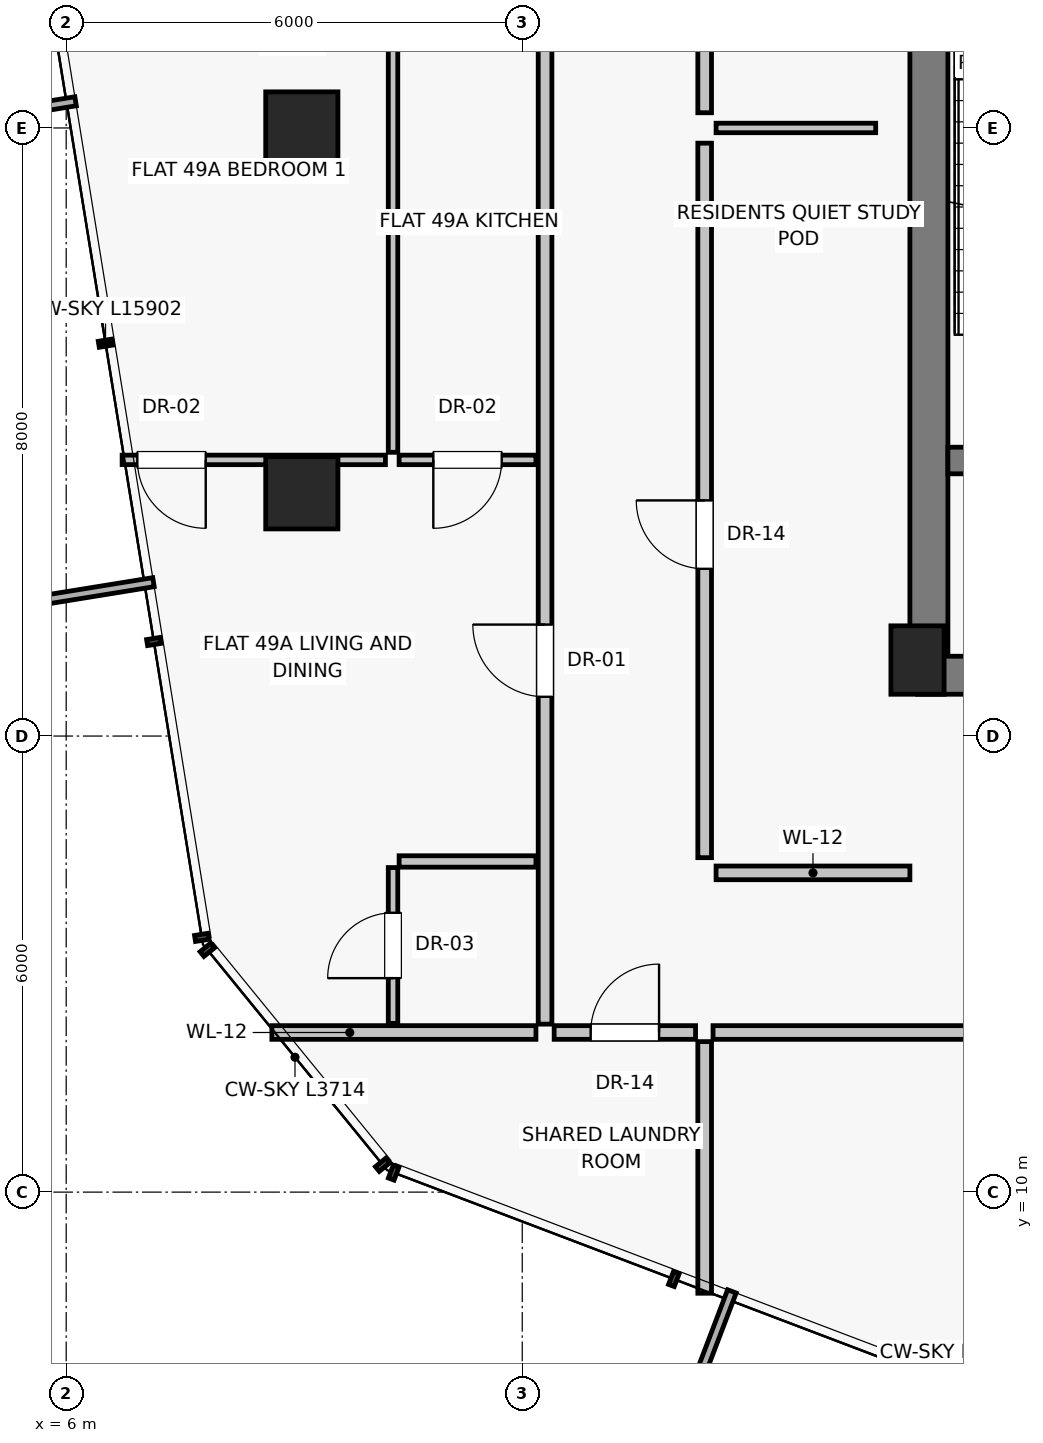
"""IFC4 building model, lengths in metres.
Left out: names, types, materials, properties, quantities, classifications, styles, units other than length and angle.
Written with IfcOpenShell. Run it as: python <this file> out.ifc"""

import sys

from ifc_helpers import new_model, si_unit, direction, frame, frame_2d, origin, origin_2d, place, context, subcontext, project, spatial, rectangle, extrude, source, transform, mapped, element, fill, save


model = new_model("IFC4")
c1 = context("Model", 3, precision=1e-05, world=origin(), true_north=direction((0.0, 1.0)))
c2 = subcontext(c1, "Body", "Model", "MODEL_VIEW")
j1 = project(units=[si_unit("LENGTHUNIT", "METRE"), si_unit("PLANEANGLEUNIT", "RADIAN")], contexts=[c1])
p1 = place(None, origin())
s1 = spatial("IfcSite", under=j1, at=p1, CompositionType="ELEMENT")
p2 = place(p1, origin())
s2 = spatial("IfcBuilding", under=s1, at=p2, CompositionType="ELEMENT")
p3 = place(p2, frame((0.0, 0.0, 174.35)))
s3 = spatial("IfcBuildingStorey", under=s2, at=p3, CompositionType="ELEMENT", Elevation=174.35)
p4 = place(p3, frame((17.2, 17.0, 0.0), z_axis=(0.0, 0.0, 1.0), x_axis=(1.0, 0.0, 0.0)))
e1 = element("IfcColumn", 1, at=p4, inside=s3, PredefinedType="PILASTER", context=c2, shape_type="SweptSolid", body=[
    extrude(rectangle(XDim=0.7, YDim=0.9, at=origin_2d()), origin(), (0.0, 0.0, 1.0), 4.5),
])
for number, where, z_axis, x_axis in (
    (2, (9.1, 24.0, -0.32), (0.0, 0.0, 1.0), (1.0, 0.0, 0.0)),
    (3, (9.1, 19.2, -0.32), (0.0, 0.0, 1.0), (1.0, 0.0, 0.0)),
):
    element("IfcColumn", number, at=place(p3, frame(where, z_axis=z_axis, x_axis=x_axis)), inside=s3, PredefinedType="COLUMN", context=c2, shape_type="SweptSolid", body=[
        extrude(rectangle(XDim=0.95, YDim=0.95, at=origin_2d()), origin(), (0.0, 0.0, 1.0), 4.82),
    ])
p5 = place(p3, frame((17.35, 16.8, 0.0), z_axis=(0.0, 0.0, 1.0), x_axis=(0.0, 1.0, 0.0)))
e4 = element("IfcWall", 4, at=p5, inside=s3, PredefinedType="SHEAR", context=c2, shape_type="SweptSolid", body=[
    extrude(rectangle(XDim=14.2, YDim=0.5, at=frame_2d((7.1, 0.0))), origin(), (0.0, 0.0, 1.0), 4.265),
])
p6 = place(p3, frame((17.2, 16.8, 0.0), z_axis=(0.0, 0.0, 1.0), x_axis=(1.0, 0.0, 0.0)))
e5 = element("IfcWall", 5, at=p6, inside=s3, PredefinedType="SHEAR", context=c2, shape_type="SweptSolid", body=[
    extrude(rectangle(XDim=5.85, YDim=0.5, at=frame_2d((2.925, 0.0))), origin(), (0.0, 0.0, 1.0), 4.265),
])
p7 = place(p6, frame((1.15, 0.0, 0.0)))
e6 = element("IfcOpeningElement", 6, at=p7, cuts=e5, PredefinedType="OPENING", context=c2, shape_type="SweptSolid", body=[
    extrude(rectangle(XDim=1.2, YDim=2.03, at=frame_2d((0.6, 1.015))), frame((0.0, 0.26, 0.0), z_axis=(0.0, -1.0, 0.0), x_axis=(1.0, 0.0, 0.0)), (0.0, 0.0, 1.0), 0.52),
])
p8 = place(p3, frame((17.6, 19.625, 0.0), z_axis=(0.0, 0.0, 1.0), x_axis=(1.0, 0.0, 0.0)))
e7 = element("IfcWall", 7, at=p8, inside=s3, PredefinedType="SHEAR", context=c2, shape_type="SweptSolid", body=[
    extrude(rectangle(XDim=3.375, YDim=0.35, at=frame_2d((1.688, 0.0))), origin(), (0.0, 0.0, 1.0), 4.265),
])
p9 = place(p8, frame((1.05, 0.0, 0.0)))
e8 = element("IfcOpeningElement", 8, at=p9, cuts=e7, PredefinedType="OPENING", context=c2, shape_type="SweptSolid", body=[
    extrude(rectangle(XDim=1.1, YDim=2.03, at=frame_2d((0.55, 1.015))), frame((0.0, 0.185, 0.0), z_axis=(0.0, -1.0, 0.0), x_axis=(1.0, 0.0, 0.0)), (0.0, 0.0, 1.0), 0.37),
])
p10 = place(p3, frame((14.4, 14.4, 0.0), z_axis=(0.0, 0.0, 1.0), x_axis=(0.0, 1.0, 0.0)))
e9 = element("IfcWall", 9, at=p10, inside=s3, PredefinedType="PARTITIONING", context=c2, shape_type="SweptSolid", body=[
    extrude(rectangle(XDim=9.4, YDim=0.18, at=frame_2d((4.7, 0.0))), origin(), (0.0, 0.0, 1.0), 4.265),
])
p11 = place(p10, frame((3.8, 0.0, 0.0)))
e10 = element("IfcOpeningElement", 10, at=p11, cuts=e9, PredefinedType="OPENING", context=c2, shape_type="SweptSolid", body=[
    extrude(rectangle(XDim=0.9, YDim=2.01, at=frame_2d((0.45, 1.005))), frame((0.0, 0.1, 0.0), z_axis=(0.0, -1.0, 0.0), x_axis=(1.0, 0.0, 0.0)), (0.0, 0.0, 1.0), 0.2),
])
p12 = place(p3, frame((14.4, 24.2, 0.0), z_axis=(0.0, 0.0, 1.0), x_axis=(0.0, 1.0, 0.0)))
e11 = element("IfcWall", 11, at=p12, inside=s3, PredefinedType="PARTITIONING", context=c2, shape_type="SweptSolid", body=[
    extrude(rectangle(XDim=9.2, YDim=0.18, at=frame_2d((4.6, 0.0))), origin(), (0.0, 0.0, 1.0), 4.265),
])
p13 = place(p12, frame((3.8, 0.0, 0.0)))
e12 = element("IfcOpeningElement", 12, at=p13, cuts=e11, PredefinedType="OPENING", context=c2, shape_type="SweptSolid", body=[
    extrude(rectangle(XDim=0.9, YDim=2.01, at=frame_2d((0.45, 1.005))), frame((0.0, 0.1, 0.0), z_axis=(0.0, -1.0, 0.0), x_axis=(1.0, 0.0, 0.0)), (0.0, 0.0, 1.0), 0.2),
])
p14 = place(p3, frame((14.55, 24.0, 0.0), z_axis=(0.0, 0.0, 1.0), x_axis=(1.0, 0.0, 0.0)))
e13 = element("IfcWall", 13, at=p14, inside=s3, PredefinedType="PARTITIONING", context=c2, shape_type="SweptSolid", body=[
    extrude(rectangle(XDim=2.1, YDim=0.125, at=frame_2d((1.05, 0.0))), origin(), (0.0, 0.0, 1.0), 4.265),
])
p15 = place(p3, frame((14.55, 14.2, 0.0), z_axis=(0.0, 0.0, 1.0), x_axis=(1.0, 0.0, 0.0)))
e14 = element("IfcWall", 14, at=p15, inside=s3, PredefinedType="PARTITIONING", context=c2, shape_type="SweptSolid", body=[
    extrude(rectangle(XDim=2.55, YDim=0.18, at=frame_2d((1.275, 0.0))), origin(), (0.0, 0.0, 1.0), 4.265),
])
p16 = place(p3, frame((14.4, 11.98, 0.0), z_axis=(0.0, 0.0, 1.0), x_axis=(0.0, -1.0, 0.0)))
e15 = element("IfcWall", 15, at=p16, inside=s3, PredefinedType="PARTITIONING", context=c2, shape_type="SweptSolid", body=[
    extrude(rectangle(XDim=3.31, YDim=0.18, at=frame_2d((1.655, 0.0))), origin(), (0.0, 0.0, 1.0), 4.265),
])
p17 = place(p3, frame((14.51, 12.1, 0.0), z_axis=(0.0, 0.0, 1.0), x_axis=(1.0, 0.0, 0.0)))
e16 = element("IfcWall", 16, at=p17, inside=s3, PredefinedType="PARTITIONING", context=c2, shape_type="SweptSolid", body=[
    extrude(rectangle(XDim=10.724, YDim=0.18, at=frame_2d((5.362, 0.0))), origin(), (0.0, 0.0, 1.0), 4.265),
])
p18 = place(p17, frame((4.462, 0.0, 0.0)))
e17 = element("IfcOpeningElement", 17, at=p18, cuts=e16, PredefinedType="OPENING", context=c2, shape_type="SweptSolid", body=[
    extrude(rectangle(XDim=1.8, YDim=2.25, at=frame_2d((0.9, 1.125))), frame((0.0, 0.1, 0.0), z_axis=(0.0, -1.0, 0.0), x_axis=(1.0, 0.0, 0.0)), (0.0, 0.0, 1.0), 0.2),
])
p19 = place(p3, frame((12.18, 12.1, 0.0), z_axis=(0.0, 0.0, 1.0), x_axis=(-1.0, 0.0, 0.0)))
e18 = element("IfcWall", 18, at=p19, inside=s3, PredefinedType="PARTITIONING", context=c2, shape_type="SweptSolid", body=[
    extrude(rectangle(XDim=3.474, YDim=0.18, at=frame_2d((1.737, 0.0))), origin(), (0.0, 0.0, 1.0), 4.265),
])
p20 = place(p3, frame((12.3, 12.21, 0.0), z_axis=(0.0, 0.0, 1.0), x_axis=(0.0, 1.0, 0.0)))
e19 = element("IfcWall", 19, at=p20, inside=s3, PredefinedType="PARTITIONING", context=c2, shape_type="SweptSolid", body=[
    extrude(rectangle(XDim=13.232, YDim=0.18, at=frame_2d((6.616, 0.0))), origin(), (0.0, 0.0, 1.0), 4.265),
])
p21 = place(p20, frame((4.306, 0.0, 0.0)))
e20 = element("IfcOpeningElement", 20, at=p21, cuts=e19, PredefinedType="OPENING", context=c2, shape_type="SweptSolid", body=[
    extrude(rectangle(XDim=0.95, YDim=2.02, at=frame_2d((0.475, 1.01))), frame((0.0, 0.1, 0.0), z_axis=(0.0, -1.0, 0.0), x_axis=(1.0, 0.0, 0.0)), (0.0, 0.0, 1.0), 0.2),
])
p22 = place(p3, frame((12.18, 14.35, 0.0), z_axis=(0.0, 0.0, 1.0), x_axis=(-1.0, 0.0, 0.0)))
e21 = element("IfcWall", 21, at=p22, inside=s3, PredefinedType="PARTITIONING", context=c2, shape_type="SweptSolid", body=[
    extrude(rectangle(XDim=1.8, YDim=0.15, at=frame_2d((0.9, 0.0))), origin(), (0.0, 0.0, 1.0), 4.265),
])
p23 = place(p3, frame((10.3, 12.22, 0.0), z_axis=(0.0, 0.0, 1.0), x_axis=(0.0, 1.0, 0.0)))
e22 = element("IfcWall", 22, at=p23, inside=s3, PredefinedType="PARTITIONING", context=c2, shape_type="SweptSolid", body=[
    extrude(rectangle(XDim=2.05, YDim=0.125, at=frame_2d((1.025, 0.0))), origin(), (0.0, 0.0, 1.0), 4.265),
])
p24 = place(p23, frame((0.595, 0.0, 0.0)))
e23 = element("IfcOpeningElement", 23, at=p24, cuts=e22, PredefinedType="OPENING", context=c2, shape_type="SweptSolid", body=[
    extrude(rectangle(XDim=0.86, YDim=2.01, at=frame_2d((0.43, 1.005))), frame((0.0, 0.073, 0.0), z_axis=(0.0, -1.0, 0.0), x_axis=(1.0, 0.0, 0.0)), (0.0, 0.0, 1.0), 0.145),
])
p25 = place(p3, frame((12.18, 19.633, 0.0), z_axis=(0.0, 0.0, 1.0), x_axis=(-1.0, 0.0, 0.0)))
e24 = element("IfcWall", 24, at=p25, inside=s3, PredefinedType="PARTITIONING", context=c2, shape_type="SweptSolid", body=[
    extrude(rectangle(XDim=1.8, YDim=0.125, at=frame_2d((0.9, 0.0))), origin(), (0.0, 0.0, 1.0), 4.265),
])
p26 = place(p25, frame((0.45, 0.0, 0.0)))
e25 = element("IfcOpeningElement", 25, at=p26, cuts=e24, PredefinedType="OPENING", context=c2, shape_type="SweptSolid", body=[
    extrude(rectangle(XDim=0.9, YDim=2.01, at=frame_2d((0.45, 1.005))), frame((0.0, 0.073, 0.0), z_axis=(0.0, -1.0, 0.0), x_axis=(1.0, 0.0, 0.0)), (0.0, 0.0, 1.0), 0.145),
])
p27 = place(p3, frame((10.3, 19.733, 0.0), z_axis=(0.0, 0.0, 1.0), x_axis=(0.0, 1.0, 0.0)))
e26 = element("IfcWall", 26, at=p27, inside=s3, PredefinedType="PARTITIONING", context=c2, shape_type="SweptSolid", body=[
    extrude(rectangle(XDim=5.699, YDim=0.125, at=frame_2d((2.85, 0.0))), origin(), (0.0, 0.0, 1.0), 4.265),
])
p28 = place(p3, frame((10.2, 19.633, 0.0), z_axis=(0.0, 0.0, 1.0), x_axis=(-1.0, 0.0, 0.0)))
e27 = element("IfcWall", 27, at=p28, inside=s3, PredefinedType="PARTITIONING", context=c2, shape_type="SweptSolid", body=[
    extrude(rectangle(XDim=3.464, YDim=0.125, at=frame_2d((1.732, 0.0))), origin(), (0.0, 0.0, 1.0), 3.719),
])
p29 = place(p28, frame((2.364, 0.0, 0.0)))
e28 = element("IfcOpeningElement", 28, at=p29, cuts=e27, PredefinedType="OPENING", context=c2, shape_type="SweptSolid", body=[
    extrude(rectangle(XDim=0.9, YDim=2.01, at=frame_2d((0.45, 1.005))), frame((0.0, 0.073, 0.0), z_axis=(0.0, -1.0, 0.0), x_axis=(1.0, 0.0, 0.0)), (0.0, 0.0, 1.0), 0.145),
])
p30 = place(p3, frame((12.42, 12.1, 0.0), z_axis=(0.0, 0.0, 1.0), x_axis=(1.0, 0.0, 0.0)))
e29 = element("IfcWall", 29, at=p30, inside=s3, PredefinedType="PARTITIONING", context=c2, shape_type="SweptSolid", body=[
    extrude(rectangle(XDim=1.86, YDim=0.18, at=frame_2d((0.93, 0.0))), origin(), (0.0, 0.0, 1.0), 4.265),
])
p31 = place(p30, frame((0.48, 0.0, 0.0)))
e30 = element("IfcOpeningElement", 30, at=p31, cuts=e29, PredefinedType="OPENING", context=c2, shape_type="SweptSolid", body=[
    extrude(rectangle(XDim=0.9, YDim=2.01, at=frame_2d((0.45, 1.005))), frame((0.0, 0.1, 0.0), z_axis=(0.0, -1.0, 0.0), x_axis=(1.0, 0.0, 0.0)), (0.0, 0.0, 1.0), 0.2),
])
m1 = source(origin(), c2, "Body", "SweptSolid", [
    extrude(rectangle(XDim=0.9, YDim=2.01, at=frame_2d((0.45, 1.005))), frame((0.0, 0.025, 0.0), z_axis=(0.0, -1.0, 0.0), x_axis=(1.0, 0.0, 0.0)), (0.0, 0.0, 1.0), 0.05),
])
p32 = place(p11, origin())
e31 = element("IfcDoor", 31, at=p32, inside=s3, OperationType="SINGLE_SWING_RIGHT", PredefinedType="DOOR", context=c2, shape_type="MappedRepresentation", body=[
    mapped(m1, transform((0.0, 0.0, 0.0), scale=1.0)),
])
fill(e10, e31)
m2 = source(origin(), c2, "Body", "SweptSolid", [
    extrude(rectangle(XDim=0.95, YDim=2.02, at=frame_2d((0.475, 1.01))), frame((0.0, 0.025, 0.0), z_axis=(0.0, -1.0, 0.0), x_axis=(1.0, 0.0, 0.0)), (0.0, 0.0, 1.0), 0.05),
])
p33 = place(p21, origin())
e32 = element("IfcDoor", 32, at=p33, inside=s3, OperationType="SINGLE_SWING_RIGHT", PredefinedType="DOOR", context=c2, shape_type="MappedRepresentation", body=[
    mapped(m2, transform((0.0, 0.0, 0.0), scale=1.0)),
])
fill(e20, e32)
m3 = source(origin(), c2, "Body", "SweptSolid", [
    extrude(rectangle(XDim=0.86, YDim=2.01, at=frame_2d((0.43, 1.005))), frame((0.0, 0.025, 0.0), z_axis=(0.0, -1.0, 0.0), x_axis=(1.0, 0.0, 0.0)), (0.0, 0.0, 1.0), 0.05),
])
p34 = place(p24, origin())
e33 = element("IfcDoor", 33, at=p34, inside=s3, OperationType="SINGLE_SWING_LEFT", PredefinedType="DOOR", context=c2, shape_type="MappedRepresentation", body=[
    mapped(m3, transform((0.0, 0.0, 0.0), scale=1.0)),
])
fill(e23, e33)
p35 = place(p26, origin())
e34 = element("IfcDoor", 34, at=p35, inside=s3, OperationType="SINGLE_SWING_RIGHT", PredefinedType="DOOR", context=c2, shape_type="MappedRepresentation", body=[
    mapped(m1, transform((0.0, 0.0, 0.0), scale=1.0)),
])
fill(e25, e34)
p36 = place(p29, origin())
e35 = element("IfcDoor", 35, at=p36, inside=s3, OperationType="SINGLE_SWING_LEFT", PredefinedType="DOOR", context=c2, shape_type="MappedRepresentation", body=[
    mapped(m1, transform((0.0, 0.0, 0.0), scale=1.0)),
])
fill(e28, e35)
p37 = place(p31, origin())
e36 = element("IfcDoor", 36, at=p37, inside=s3, OperationType="SINGLE_SWING_RIGHT", PredefinedType="DOOR", context=c2, shape_type="MappedRepresentation", body=[
    mapped(m1, transform((0.0, 0.0, 0.0), scale=1.0)),
])
fill(e30, e36)
save(model, sys.argv[1])
